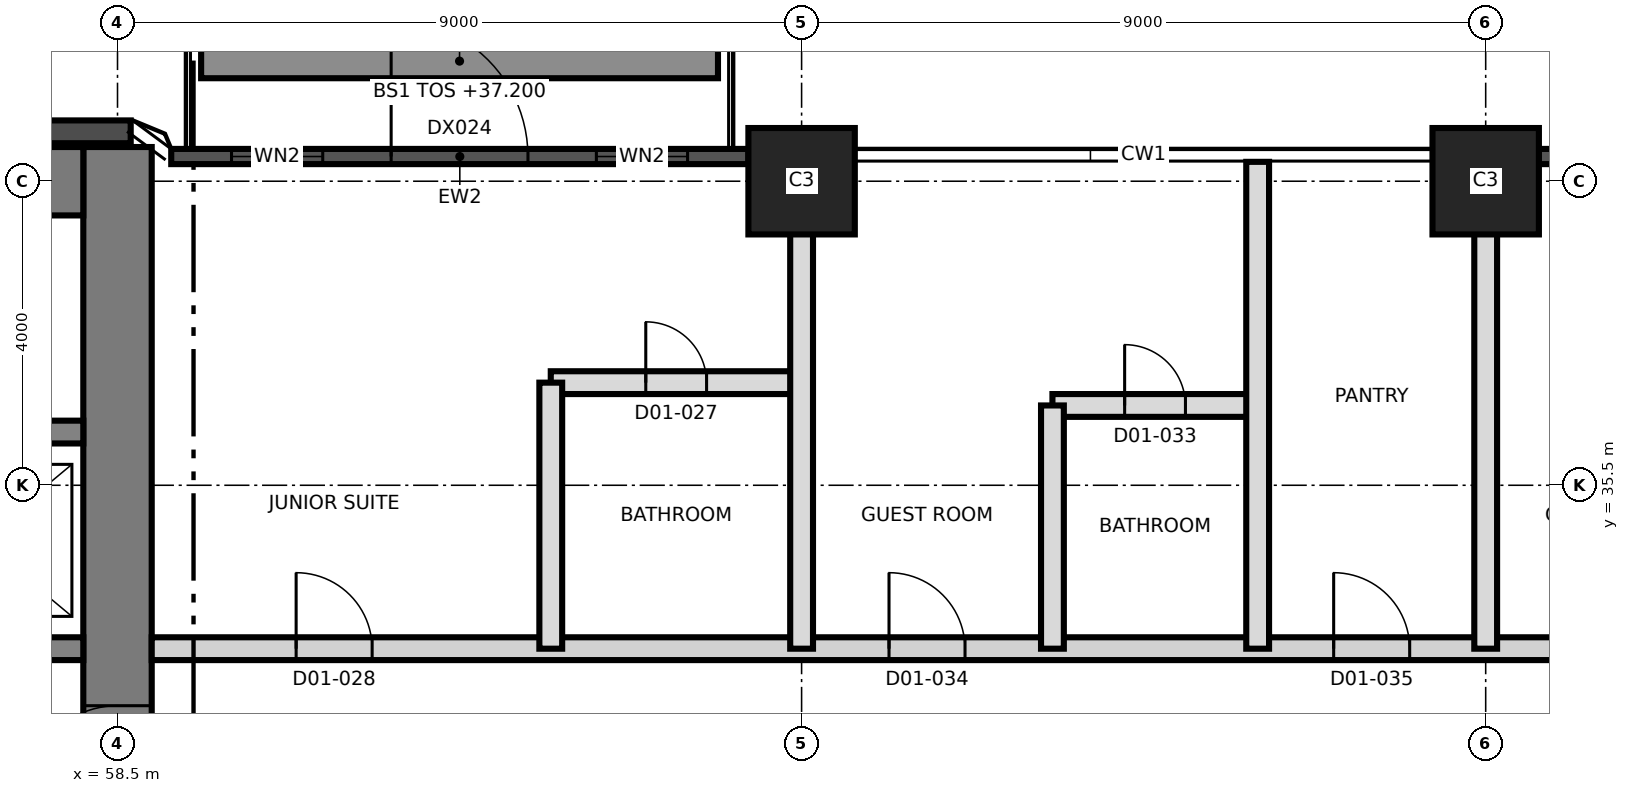
"""IFC4 building model, lengths in metres.
Left out: names, types, materials, properties, quantities, classifications, styles, units other than length and angle.
Written with IfcOpenShell. Run it as: python <this file> out.ifc"""

import sys

from ifc_helpers import new_model, si_unit, direction, frame, frame_2d, origin, origin_2d, place, context, subcontext, project, spatial, rectangle, extrude, element, fill, save


model = new_model("IFC4")
c1 = context("Model", 3, precision=1e-05, world=origin(), true_north=direction((0.0, 1.0)))
c2 = subcontext(c1, "Body", "Model", "MODEL_VIEW")
j1 = project(units=[si_unit("LENGTHUNIT", "METRE"), si_unit("PLANEANGLEUNIT", "RADIAN")], contexts=[c1])
p1 = place(None, origin())
s1 = spatial("IfcSite", under=j1, at=p1, CompositionType="ELEMENT")
p2 = place(p1, origin())
s2 = spatial("IfcBuilding", under=s1, at=p2, CompositionType="ELEMENT")
p3 = place(p2, frame((0.0, 0.0, 37.2)))
s3 = spatial("IfcBuildingStorey", under=s2, at=p3, CompositionType="ELEMENT", Elevation=37.2)
p4 = place(p3, frame((58.5, 21.05, 0.0), z_axis=(0.0, 0.0, 1.0), x_axis=(0.0, 1.0, 0.0)))
e1 = element("IfcWall", 1, at=p4, inside=s3, PredefinedType="SHEAR", context=c2, shape_type="SweptSolid", body=[
    extrude(rectangle(XDim=18.9, YDim=0.9, at=frame_2d((9.45, 0.0))), origin(), (0.0, 0.0, 1.0), 3.7),
])
p5 = place(p4, frame((10.35, 0.0, 0.0)))
e2 = element("IfcOpeningElement", 2, at=p5, cuts=e1, PredefinedType="OPENING", context=c2, shape_type="SweptSolid", body=[
    extrude(rectangle(XDim=1.2, YDim=2.1, at=frame_2d((0.6, 1.05))), frame((0.0, 0.46, 0.0), z_axis=(0.0, -1.0, 0.0), x_axis=(1.0, 0.0, 0.0)), (0.0, 0.0, 1.0), 0.92),
])
p6 = place(p3, frame((31.05, 39.5, 0.0), z_axis=(0.0, 0.0, 1.0), x_axis=(1.0, 0.0, 0.0)))
e3 = element("IfcWall", 3, at=p6, inside=s3, PredefinedType="SHEAR", context=c2, shape_type="SweptSolid", body=[
    extrude(rectangle(XDim=27.0, YDim=0.9, at=frame_2d((13.5, 0.0))), origin(), (0.0, 0.0, 1.0), 3.7),
])
p7 = place(p6, frame((10.65, 0.0, 0.0)))
e4 = element("IfcOpeningElement", 4, at=p7, cuts=e3, PredefinedType="OPENING", context=c2, shape_type="SweptSolid", body=[
    extrude(rectangle(XDim=1.2, YDim=2.1, at=frame_2d((0.6, 1.05))), frame((0.0, 0.46, 0.0), z_axis=(0.0, -1.0, 0.0), x_axis=(1.0, 0.0, 0.0)), (0.0, 0.0, 1.0), 0.92),
])
p8 = place(p3, frame((31.95, 33.35, 0.0), z_axis=(0.0, 0.0, 1.0), x_axis=(1.0, 0.0, 0.0)))
e5 = element("IfcWall", 5, at=p8, inside=s3, PredefinedType="SHEAR", context=c2, shape_type="SweptSolid", body=[
    extrude(rectangle(XDim=26.1, YDim=0.3, at=frame_2d((13.05, 0.0))), origin(), (0.0, 0.0, 1.0), 3.7),
])
p9 = place(p8, frame((13.7, 0.0, 0.0)))
e6 = element("IfcOpeningElement", 6, at=p9, cuts=e5, PredefinedType="OPENING", context=c2, shape_type="SweptSolid", body=[
    extrude(rectangle(XDim=1.4, YDim=2.1, at=frame_2d((0.7, 1.05))), frame((0.0, 0.16, 0.0), z_axis=(0.0, -1.0, 0.0), x_axis=(1.0, 0.0, 0.0)), (0.0, 0.0, 1.0), 0.32),
])
p10 = place(p8, frame((5.175, 0.0, 0.0)))
e7 = element("IfcOpeningElement", 7, at=p10, cuts=e5, PredefinedType="OPENING", context=c2, shape_type="SweptSolid", body=[
    extrude(rectangle(XDim=1.2, YDim=2.1, at=frame_2d((0.6, 1.05))), frame((0.0, 0.16, 0.0), z_axis=(0.0, -1.0, 0.0), x_axis=(1.0, 0.0, 0.0)), (0.0, 0.0, 1.0), 0.32),
])
p11 = place(p8, frame((19.725, 0.0, 0.0)))
e8 = element("IfcOpeningElement", 8, at=p11, cuts=e5, PredefinedType="OPENING", context=c2, shape_type="SweptSolid", body=[
    extrude(rectangle(XDim=1.2, YDim=2.1, at=frame_2d((0.6, 1.05))), frame((0.0, 0.16, 0.0), z_axis=(0.0, -1.0, 0.0), x_axis=(1.0, 0.0, 0.0)), (0.0, 0.0, 1.0), 0.32),
])
p12 = place(p3, frame((43.5, 36.2, 0.0), z_axis=(0.0, 0.0, 1.0), x_axis=(1.0, 0.0, 0.0)))
e9 = element("IfcWall", 9, at=p12, inside=s3, PredefinedType="SHEAR", context=c2, shape_type="SweptSolid", body=[
    extrude(rectangle(XDim=14.55, YDim=0.3, at=frame_2d((7.275, 0.0))), origin(), (0.0, 0.0, 1.0), 3.7),
])
p13 = place(p12, frame((6.9, 0.0, 0.0)))
e10 = element("IfcOpeningElement", 10, at=p13, cuts=e9, PredefinedType="OPENING", context=c2, shape_type="SweptSolid", body=[
    extrude(rectangle(XDim=1.2, YDim=2.1, at=frame_2d((0.6, 1.05))), frame((0.0, 0.16, 0.0), z_axis=(0.0, -1.0, 0.0), x_axis=(1.0, 0.0, 0.0)), (0.0, 0.0, 1.0), 0.32),
])
p14 = place(p12, frame((0.7, 0.0, 0.0)))
e11 = element("IfcOpeningElement", 11, at=p14, cuts=e9, PredefinedType="OPENING", context=c2, shape_type="SweptSolid", body=[
    extrude(rectangle(XDim=1.3, YDim=2.4, at=frame_2d((0.65, 1.2))), frame((0.0, 0.16, 0.0), z_axis=(0.0, -1.0, 0.0), x_axis=(1.0, 0.0, 0.0)), (0.0, 0.0, 1.0), 0.32),
])
p15 = place(p12, frame((3.7, 0.0, 0.0)))
e12 = element("IfcOpeningElement", 12, at=p15, cuts=e9, PredefinedType="OPENING", context=c2, shape_type="SweptSolid", body=[
    extrude(rectangle(XDim=1.3, YDim=2.4, at=frame_2d((0.65, 1.2))), frame((0.0, 0.16, 0.0), z_axis=(0.0, -1.0, 0.0), x_axis=(1.0, 0.0, 0.0)), (0.0, 0.0, 1.0), 0.32),
])
for number, where, z_axis, x_axis in (
    (13, (67.5, 39.5, 0.0), (0.0, 0.0, 1.0), (1.0, 0.0, 0.0)),
    (14, (76.5, 39.5, 0.0), (0.0, 0.0, 1.0), (1.0, 0.0, 0.0)),
):
    element("IfcColumn", number, at=place(p3, frame(where, z_axis=z_axis, x_axis=x_axis)), inside=s3, PredefinedType="COLUMN", context=c2, shape_type="SweptSolid", body=[
        extrude(rectangle(XDim=1.4, YDim=1.4, at=origin_2d()), origin(), (0.0, 0.0, 1.0), 3.7),
    ])
p16 = place(p3, frame((63.0, 41.08, 0.0), z_axis=(0.0, 0.0, 1.0), x_axis=(1.0, 0.0, 0.0)))
e15 = element("IfcWall", 15, at=p16, inside=s3, PredefinedType="SOLIDWALL", context=c2, shape_type="SweptSolid", body=[
    extrude(rectangle(XDim=6.8, YDim=0.45, at=origin_2d()), origin(), (0.0, 0.0, 1.0), 1.0),
])
p17 = place(p3, frame((58.674, 40.15, 0.0), z_axis=(0.0, 0.0, 1.0), x_axis=(-1.0, 0.0, 0.0)))
e16 = element("IfcWall", 16, at=p17, inside=s3, PredefinedType="SOLIDWALL", context=c2, shape_type="SweptSolid", body=[
    extrude(rectangle(XDim=5.116, YDim=0.3, at=frame_2d((2.558, 0.0))), origin(), (0.0, 0.0, 1.0), 3.4),
])
p18 = place(p3, frame((77.2, 39.825, 0.0), z_axis=(0.0, 0.0, 1.0), x_axis=(1.0, 0.0, 0.0)))
e17 = element("IfcWall", 17, at=p18, inside=s3, PredefinedType="SOLIDWALL", context=c2, shape_type="SweptSolid", body=[
    extrude(rectangle(XDim=7.6, YDim=0.2, at=frame_2d((3.8, 0.0))), origin(), (0.0, 0.0, 1.0), 3.4),
])
p19 = place(p18, frame((2.9, 0.0, 0.0)))
e18 = element("IfcOpeningElement", 18, at=p19, cuts=e17, PredefinedType="OPENING", context=c2, shape_type="SweptSolid", body=[
    extrude(rectangle(XDim=1.8, YDim=2.4, at=frame_2d((0.9, 1.2))), frame((0.0, 0.11, 0.0), z_axis=(0.0, -1.0, 0.0), x_axis=(1.0, 0.0, 0.0)), (0.0, 0.0, 1.0), 0.22),
])
p20 = place(p18, frame((5.6, 0.0, 0.9)))
e19 = element("IfcOpeningElement", 19, at=p20, cuts=e17, PredefinedType="OPENING", context=c2, shape_type="SweptSolid", body=[
    extrude(rectangle(XDim=1.2, YDim=2.1, at=frame_2d((0.6, 1.05))), frame((0.0, 0.11, 0.0), z_axis=(0.0, -1.0, 0.0), x_axis=(1.0, 0.0, 0.0)), (0.0, 0.0, 1.0), 0.22),
])
p21 = place(p18, frame((0.8, 0.0, 0.9)))
e20 = element("IfcOpeningElement", 20, at=p21, cuts=e17, PredefinedType="OPENING", context=c2, shape_type="SweptSolid", body=[
    extrude(rectangle(XDim=1.2, YDim=2.1, at=frame_2d((0.6, 1.05))), frame((0.0, 0.11, 0.0), z_axis=(0.0, -1.0, 0.0), x_axis=(1.0, 0.0, 0.0)), (0.0, 0.0, 1.0), 0.22),
])
p22 = place(p3, frame((59.207, 39.825, 0.0), z_axis=(0.0, 0.0, 1.0), x_axis=(1.0, 0.0, 0.0)))
e21 = element("IfcWall", 21, at=p22, inside=s3, PredefinedType="SOLIDWALL", context=c2, shape_type="SweptSolid", body=[
    extrude(rectangle(XDim=7.593, YDim=0.2, at=frame_2d((3.797, 0.0))), origin(), (0.0, 0.0, 1.0), 3.4),
])
p23 = place(p22, frame((2.893, 0.0, 0.0)))
e22 = element("IfcOpeningElement", 22, at=p23, cuts=e21, PredefinedType="OPENING", context=c2, shape_type="SweptSolid", body=[
    extrude(rectangle(XDim=1.8, YDim=2.4, at=frame_2d((0.9, 1.2))), frame((0.0, 0.11, 0.0), z_axis=(0.0, -1.0, 0.0), x_axis=(1.0, 0.0, 0.0)), (0.0, 0.0, 1.0), 0.22),
])
p24 = place(p22, frame((5.593, 0.0, 0.9)))
e23 = element("IfcOpeningElement", 23, at=p24, cuts=e21, PredefinedType="OPENING", context=c2, shape_type="SweptSolid", body=[
    extrude(rectangle(XDim=1.2, YDim=2.1, at=frame_2d((0.6, 1.05))), frame((0.0, 0.11, 0.0), z_axis=(0.0, -1.0, 0.0), x_axis=(1.0, 0.0, 0.0)), (0.0, 0.0, 1.0), 0.22),
])
p25 = place(p22, frame((0.793, 0.0, 0.9)))
e24 = element("IfcOpeningElement", 24, at=p25, cuts=e21, PredefinedType="OPENING", context=c2, shape_type="SweptSolid", body=[
    extrude(rectangle(XDim=1.2, YDim=2.1, at=frame_2d((0.6, 1.05))), frame((0.0, 0.11, 0.0), z_axis=(0.0, -1.0, 0.0), x_axis=(1.0, 0.0, 0.0)), (0.0, 0.0, 1.0), 0.22),
])
p26 = place(p3, frame((58.95, 33.35, 0.0), z_axis=(0.0, 0.0, 1.0), x_axis=(1.0, 0.0, 0.0)))
e25 = element("IfcWall", 25, at=p26, inside=s3, PredefinedType="PARTITIONING", context=c2, shape_type="SweptSolid", body=[
    extrude(rectangle(XDim=26.38, YDim=0.3, at=frame_2d((13.19, 0.0))), origin(), (0.0, 0.0, 1.0), 3.4),
])
p27 = place(p26, frame((1.9, 0.0, 0.0)))
e26 = element("IfcOpeningElement", 26, at=p27, cuts=e25, PredefinedType="OPENING", context=c2, shape_type="SweptSolid", body=[
    extrude(rectangle(XDim=1.0, YDim=2.4, at=frame_2d((0.5, 1.2))), frame((0.0, 0.16, 0.0), z_axis=(0.0, -1.0, 0.0), x_axis=(1.0, 0.0, 0.0)), (0.0, 0.0, 1.0), 0.32),
])
p28 = place(p26, frame((9.7, 0.0, 0.0)))
e27 = element("IfcOpeningElement", 27, at=p28, cuts=e25, PredefinedType="OPENING", context=c2, shape_type="SweptSolid", body=[
    extrude(rectangle(XDim=1.0, YDim=2.1, at=frame_2d((0.5, 1.05))), frame((0.0, 0.16, 0.0), z_axis=(0.0, -1.0, 0.0), x_axis=(1.0, 0.0, 0.0)), (0.0, 0.0, 1.0), 0.32),
])
p29 = place(p26, frame((15.55, 0.0, 0.0)))
e28 = element("IfcOpeningElement", 28, at=p29, cuts=e25, PredefinedType="OPENING", context=c2, shape_type="SweptSolid", body=[
    extrude(rectangle(XDim=1.0, YDim=2.1, at=frame_2d((0.5, 1.05))), frame((0.0, 0.16, 0.0), z_axis=(0.0, -1.0, 0.0), x_axis=(1.0, 0.0, 0.0)), (0.0, 0.0, 1.0), 0.32),
])
p30 = place(p26, frame((18.7, 0.0, 0.0)))
e29 = element("IfcOpeningElement", 29, at=p30, cuts=e25, PredefinedType="OPENING", context=c2, shape_type="SweptSolid", body=[
    extrude(rectangle(XDim=1.0, YDim=2.1, at=frame_2d((0.5, 1.05))), frame((0.0, 0.16, 0.0), z_axis=(0.0, -1.0, 0.0), x_axis=(1.0, 0.0, 0.0)), (0.0, 0.0, 1.0), 0.32),
])
p31 = place(p26, frame((24.55, 0.0, 0.0)))
e30 = element("IfcOpeningElement", 30, at=p31, cuts=e25, PredefinedType="OPENING", context=c2, shape_type="SweptSolid", body=[
    extrude(rectangle(XDim=1.0, YDim=2.1, at=frame_2d((0.5, 1.05))), frame((0.0, 0.16, 0.0), z_axis=(0.0, -1.0, 0.0), x_axis=(1.0, 0.0, 0.0)), (0.0, 0.0, 1.0), 0.32),
])
p32 = place(p3, frame((70.8, 36.55, 0.0), z_axis=(0.0, 0.0, 1.0), x_axis=(1.0, 0.0, 0.0)))
e31 = element("IfcWall", 31, at=p32, inside=s3, PredefinedType="PARTITIONING", context=c2, shape_type="SweptSolid", body=[
    extrude(rectangle(XDim=2.7, YDim=0.3, at=frame_2d((1.35, 0.0))), origin(), (0.0, 0.0, 1.0), 3.4),
])
p33 = place(p32, frame((0.95, 0.0, 0.0)))
e32 = element("IfcOpeningElement", 32, at=p33, cuts=e31, PredefinedType="OPENING", context=c2, shape_type="SweptSolid", body=[
    extrude(rectangle(XDim=0.8, YDim=2.1, at=frame_2d((0.4, 1.05))), frame((0.0, 0.16, 0.0), z_axis=(0.0, -1.0, 0.0), x_axis=(1.0, 0.0, 0.0)), (0.0, 0.0, 1.0), 0.32),
])
p34 = place(p3, frame((64.2, 36.85, 0.0), z_axis=(0.0, 0.0, 1.0), x_axis=(1.0, 0.0, 0.0)))
e33 = element("IfcWall", 33, at=p34, inside=s3, PredefinedType="PARTITIONING", context=c2, shape_type="SweptSolid", body=[
    extrude(rectangle(XDim=3.3, YDim=0.3, at=frame_2d((1.65, 0.0))), origin(), (0.0, 0.0, 1.0), 3.4),
])
p35 = place(p34, frame((1.25, 0.0, 0.0)))
e34 = element("IfcOpeningElement", 34, at=p35, cuts=e33, PredefinedType="OPENING", context=c2, shape_type="SweptSolid", body=[
    extrude(rectangle(XDim=0.8, YDim=2.1, at=frame_2d((0.4, 1.05))), frame((0.0, 0.16, 0.0), z_axis=(0.0, -1.0, 0.0), x_axis=(1.0, 0.0, 0.0)), (0.0, 0.0, 1.0), 0.32),
])
p36 = place(p3, frame((64.2, 33.35, 0.0), z_axis=(0.0, 0.0, 1.0), x_axis=(0.0, 1.0, 0.0)))
e35 = element("IfcWall", 35, at=p36, inside=s3, PredefinedType="PARTITIONING", context=c2, shape_type="SweptSolid", body=[
    extrude(rectangle(XDim=3.5, YDim=0.3, at=frame_2d((1.75, 0.0))), origin(), (0.0, 0.0, 1.0), 3.4),
])
p37 = place(p3, frame((67.5, 33.35, 0.0), z_axis=(0.0, 0.0, 1.0), x_axis=(0.0, 1.0, 0.0)))
e36 = element("IfcWall", 36, at=p37, inside=s3, PredefinedType="PARTITIONING", context=c2, shape_type="SweptSolid", body=[
    extrude(rectangle(XDim=6.225, YDim=0.3, at=frame_2d((3.112, 0.0))), origin(), (0.0, 0.0, 1.0), 3.4),
])
p38 = place(p3, frame((70.8, 33.35, 0.0), z_axis=(0.0, 0.0, 1.0), x_axis=(0.0, 1.0, 0.0)))
e37 = element("IfcWall", 37, at=p38, inside=s3, PredefinedType="PARTITIONING", context=c2, shape_type="SweptSolid", body=[
    extrude(rectangle(XDim=3.2, YDim=0.3, at=frame_2d((1.6, 0.0))), origin(), (0.0, 0.0, 1.0), 3.4),
])
p39 = place(p3, frame((73.5, 33.35, 0.0), z_axis=(0.0, 0.0, 1.0), x_axis=(0.0, 1.0, 0.0)))
e38 = element("IfcWall", 38, at=p39, inside=s3, PredefinedType="PARTITIONING", context=c2, shape_type="SweptSolid", body=[
    extrude(rectangle(XDim=6.405, YDim=0.3, at=frame_2d((3.202, 0.0))), origin(), (0.0, 0.0, 1.0), 3.4),
])
p40 = place(p3, frame((76.5, 33.35, 0.0), z_axis=(0.0, 0.0, 1.0), x_axis=(0.0, 1.0, 0.0)))
e39 = element("IfcWall", 39, at=p40, inside=s3, PredefinedType="PARTITIONING", context=c2, shape_type="SweptSolid", body=[
    extrude(rectangle(XDim=6.225, YDim=0.3, at=frame_2d((3.112, 0.0))), origin(), (0.0, 0.0, 1.0), 3.4),
])
p41 = place(p23, origin())
e40 = element("IfcDoor", 40, at=p41, inside=s3, OperationType="SINGLE_SWING_LEFT", PredefinedType="DOOR", context=c2, shape_type="SweptSolid", body=[
    extrude(rectangle(XDim=1.8, YDim=2.4, at=frame_2d((0.9, 1.2))), frame((0.0, 0.025, 0.0), z_axis=(0.0, -1.0, 0.0), x_axis=(1.0, 0.0, 0.0)), (0.0, 0.0, 1.0), 0.05),
])
fill(e22, e40)
p42 = place(p24, origin())
e41 = element("IfcWindow", 41, at=p42, inside=s3, PartitioningType="SINGLE_PANEL", PredefinedType="WINDOW", context=c2, shape_type="SweptSolid", body=[
    extrude(rectangle(XDim=1.2, YDim=2.1, at=frame_2d((0.6, 1.05))), frame((0.0, 0.03, 0.0), z_axis=(0.0, -1.0, 0.0), x_axis=(1.0, 0.0, 0.0)), (0.0, 0.0, 1.0), 0.06),
])
fill(e23, e41)
p43 = place(p25, origin())
e42 = element("IfcWindow", 42, at=p43, inside=s3, PartitioningType="SINGLE_PANEL", PredefinedType="WINDOW", context=c2, shape_type="SweptSolid", body=[
    extrude(rectangle(XDim=1.2, YDim=2.1, at=frame_2d((0.6, 1.05))), frame((0.0, 0.03, 0.0), z_axis=(0.0, -1.0, 0.0), x_axis=(1.0, 0.0, 0.0)), (0.0, 0.0, 1.0), 0.06),
])
fill(e24, e42)
p44 = place(p5, origin())
e43 = element("IfcDoor", 43, at=p44, inside=s3, OperationType="SINGLE_SWING_LEFT", PredefinedType="DOOR", context=c2, shape_type="SweptSolid", body=[
    extrude(rectangle(XDim=1.2, YDim=2.1, at=frame_2d((0.6, 1.05))), frame((0.0, 0.025, 0.0), z_axis=(0.0, -1.0, 0.0), x_axis=(1.0, 0.0, 0.0)), (0.0, 0.0, 1.0), 0.05),
])
fill(e2, e43)
p45 = place(p35, origin())
e44 = element("IfcDoor", 44, at=p45, inside=s3, OperationType="SINGLE_SWING_LEFT", PredefinedType="DOOR", context=c2, shape_type="SweptSolid", body=[
    extrude(rectangle(XDim=0.8, YDim=2.1, at=frame_2d((0.4, 1.05))), frame((0.0, 0.025, 0.0), z_axis=(0.0, -1.0, 0.0), x_axis=(1.0, 0.0, 0.0)), (0.0, 0.0, 1.0), 0.05),
])
fill(e34, e44)
p46 = place(p27, origin())
e45 = element("IfcDoor", 45, at=p46, inside=s3, OperationType="SINGLE_SWING_LEFT", PredefinedType="DOOR", context=c2, shape_type="SweptSolid", body=[
    extrude(rectangle(XDim=1.0, YDim=2.4, at=frame_2d((0.5, 1.2))), frame((0.0, 0.025, 0.0), z_axis=(0.0, -1.0, 0.0), x_axis=(1.0, 0.0, 0.0)), (0.0, 0.0, 1.0), 0.05),
])
fill(e26, e45)
p47 = place(p33, origin())
e46 = element("IfcDoor", 46, at=p47, inside=s3, OperationType="SINGLE_SWING_LEFT", PredefinedType="DOOR", context=c2, shape_type="SweptSolid", body=[
    extrude(rectangle(XDim=0.8, YDim=2.1, at=frame_2d((0.4, 1.05))), frame((0.0, 0.025, 0.0), z_axis=(0.0, -1.0, 0.0), x_axis=(1.0, 0.0, 0.0)), (0.0, 0.0, 1.0), 0.05),
])
fill(e32, e46)
p48 = place(p28, origin())
e47 = element("IfcDoor", 47, at=p48, inside=s3, OperationType="SINGLE_SWING_LEFT", PredefinedType="DOOR", context=c2, shape_type="SweptSolid", body=[
    extrude(rectangle(XDim=1.0, YDim=2.1, at=frame_2d((0.5, 1.05))), frame((0.0, 0.025, 0.0), z_axis=(0.0, -1.0, 0.0), x_axis=(1.0, 0.0, 0.0)), (0.0, 0.0, 1.0), 0.05),
])
fill(e27, e47)
p49 = place(p29, origin())
e48 = element("IfcDoor", 48, at=p49, inside=s3, OperationType="SINGLE_SWING_RIGHT", PredefinedType="DOOR", context=c2, shape_type="SweptSolid", body=[
    extrude(rectangle(XDim=1.0, YDim=2.1, at=frame_2d((0.5, 1.05))), frame((0.0, 0.025, 0.0), z_axis=(0.0, -1.0, 0.0), x_axis=(1.0, 0.0, 0.0)), (0.0, 0.0, 1.0), 0.05),
])
fill(e28, e48)
save(model, sys.argv[1])
